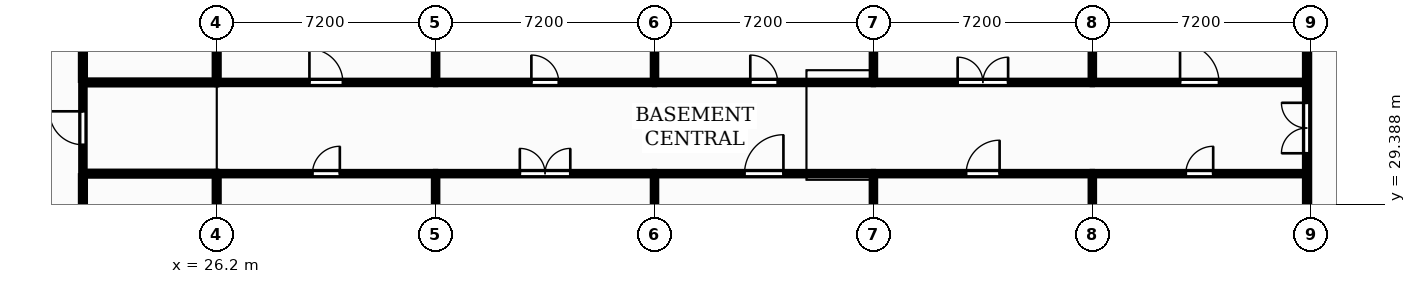
"""IFC4 building model, lengths in metres.
Left out: names, types, materials, properties, quantities, classifications, styles, units other than length and angle.
Written with IfcOpenShell. Run it as: python <this file> out.ifc"""

import sys

from ifc_helpers import new_model, si_unit, direction, frame, frame_2d, origin, place, context, subcontext, project, spatial, rectangle, extrude, element, fill, save


model = new_model("IFC4")
c1 = context("Model", 3, precision=1e-05, world=origin(), true_north=direction((0.0, 1.0)))
c2 = subcontext(c1, "Body", "Model", "MODEL_VIEW")
j1 = project(units=[si_unit("LENGTHUNIT", "METRE"), si_unit("PLANEANGLEUNIT", "RADIAN")], contexts=[c1])
p1 = place(None, origin())
s1 = spatial("IfcSite", under=j1, at=p1, CompositionType="ELEMENT")
p2 = place(p1, origin())
s2 = spatial("IfcBuilding", under=s1, at=p2, CompositionType="ELEMENT")
p3 = place(p2, frame((0.0, 0.0, -4.5)))
s3 = spatial("IfcBuildingStorey", under=s2, at=p3, CompositionType="ELEMENT", Elevation=-4.5)
p4 = place(p3, frame((21.8, 27.27, 0.0), z_axis=(0.0, 0.0, 1.0), x_axis=(0.0, 1.0, 0.0)))
e1 = element("IfcWall", 1, at=p4, inside=s3, PredefinedType="PARTITIONING", context=c2, shape_type="SweptSolid", body=[
    extrude(rectangle(XDim=3.06, YDim=0.16, at=frame_2d((1.53, 0.0))), origin(), (0.0, 0.0, 1.0), 4.08),
])
p5 = place(p4, frame((1.05, 0.0, 0.0)))
e2 = element("IfcOpeningElement", 2, at=p5, cuts=e1, PredefinedType="OPENING", context=c2, shape_type="SweptSolid", body=[
    extrude(rectangle(XDim=0.96, YDim=2.1, at=frame_2d((0.48, 1.05))), frame((0.0, 0.09, 0.0), z_axis=(0.0, -1.0, 0.0), x_axis=(1.0, 0.0, 0.0)), (0.0, 0.0, 1.0), 0.18),
])
p6 = place(p3, frame((21.8, 30.47, 0.0), z_axis=(0.0, 0.0, 1.0), x_axis=(0.0, 1.0, 0.0)))
e3 = element("IfcWall", 3, at=p6, inside=s3, PredefinedType="PARTITIONING", context=c2, shape_type="SweptSolid", body=[
    extrude(rectangle(XDim=2.86, YDim=0.14, at=frame_2d((1.43, 0.0))), origin(), (0.0, 0.0, 1.0), 4.08),
])
p7 = place(p6, frame((0.88, 0.0, 0.0)))
e4 = element("IfcOpeningElement", 4, at=p7, cuts=e3, PredefinedType="OPENING", context=c2, shape_type="SweptSolid", body=[
    extrude(rectangle(XDim=1.1, YDim=2.1, at=frame_2d((0.55, 1.05))), frame((0.0, 0.08, 0.0), z_axis=(0.0, -1.0, 0.0), x_axis=(1.0, 0.0, 0.0)), (0.0, 0.0, 1.0), 0.16),
])
p8 = place(p3, frame((21.8, 30.4, 0.0), z_axis=(0.0, 0.0, 1.0), x_axis=(1.0, 0.0, 0.0)))
e5 = element("IfcWall", 5, at=p8, inside=s3, PredefinedType="PARTITIONING", context=c2, shape_type="SweptSolid", body=[
    extrude(rectangle(XDim=4.4, YDim=0.16, at=frame_2d((2.2, 0.0))), origin(), (0.0, 0.0, 1.0), 4.08),
])
p9 = place(p3, frame((21.8, 33.47, 0.0), z_axis=(0.0, 0.0, 1.0), x_axis=(0.0, 1.0, 0.0)))
e6 = element("IfcWall", 6, at=p9, inside=s3, PredefinedType="PARTITIONING", context=c2, shape_type="SweptSolid", body=[
    extrude(rectangle(XDim=3.26, YDim=0.16, at=frame_2d((1.63, 0.0))), origin(), (0.0, 0.0, 1.0), 4.08),
])
p10 = place(p9, frame((1.15, 0.0, 0.0)))
e7 = element("IfcOpeningElement", 7, at=p10, cuts=e6, PredefinedType="OPENING", context=c2, shape_type="SweptSolid", body=[
    extrude(rectangle(XDim=0.96, YDim=2.1, at=frame_2d((0.48, 1.05))), frame((0.0, 0.09, 0.0), z_axis=(0.0, -1.0, 0.0), x_axis=(1.0, 0.0, 0.0)), (0.0, 0.0, 1.0), 0.18),
])
p11 = place(p3, frame((21.8, 33.4, 0.0), z_axis=(0.0, 0.0, 1.0), x_axis=(1.0, 0.0, 0.0)))
e8 = element("IfcWall", 8, at=p11, inside=s3, PredefinedType="PARTITIONING", context=c2, shape_type="SweptSolid", body=[
    extrude(rectangle(XDim=4.4, YDim=0.16, at=frame_2d((2.2, 0.0))), origin(), (0.0, 0.0, 1.0), 4.08),
])
p12 = place(p3, frame((26.2, 27.55, 0.0), z_axis=(0.0, 0.0, 1.0), x_axis=(0.0, 1.0, 0.0)))
e9 = element("IfcWall", 9, at=p12, inside=s3, PredefinedType="PARTITIONING", context=c2, shape_type="SweptSolid", body=[
    extrude(rectangle(XDim=2.78, YDim=0.16, at=frame_2d((1.39, 0.0))), origin(), (0.0, 0.0, 1.0), 3.4),
])
p13 = place(p3, frame((26.2, 30.4, 0.0), z_axis=(0.0, 0.0, 1.0), x_axis=(1.0, 0.0, 0.0)))
e10 = element("IfcWall", 10, at=p13, inside=s3, PredefinedType="PARTITIONING", context=c2, shape_type="SweptSolid", body=[
    extrude(rectangle(XDim=7.2, YDim=0.14, at=frame_2d((3.6, 0.0))), origin(), (0.0, 0.0, 1.0), 4.08),
])
p14 = place(p13, frame((3.15, 0.0, 0.0)))
e11 = element("IfcOpeningElement", 11, at=p14, cuts=e10, PredefinedType="OPENING", context=c2, shape_type="SweptSolid", body=[
    extrude(rectangle(XDim=0.9, YDim=2.1, at=frame_2d((0.45, 1.05))), frame((0.0, 0.08, 0.0), z_axis=(0.0, -1.0, 0.0), x_axis=(1.0, 0.0, 0.0)), (0.0, 0.0, 1.0), 0.16),
])
p15 = place(p3, frame((26.2, 33.47, 0.0), z_axis=(0.0, 0.0, 1.0), x_axis=(0.0, 1.0, 0.0)))
e12 = element("IfcWall", 12, at=p15, inside=s3, PredefinedType="PARTITIONING", context=c2, shape_type="SweptSolid", body=[
    extrude(rectangle(XDim=2.955, YDim=0.16, at=frame_2d((1.478, 0.0))), origin(), (0.0, 0.0, 1.0), 3.4),
])
p16 = place(p3, frame((26.2, 33.4, 0.0), z_axis=(0.0, 0.0, 1.0), x_axis=(1.0, 0.0, 0.0)))
e13 = element("IfcWall", 13, at=p16, inside=s3, PredefinedType="PARTITIONING", context=c2, shape_type="SweptSolid", body=[
    extrude(rectangle(XDim=7.2, YDim=0.14, at=frame_2d((3.6, 0.0))), origin(), (0.0, 0.0, 1.0), 4.08),
])
p17 = place(p16, frame((3.05, 0.0, 0.0)))
e14 = element("IfcOpeningElement", 14, at=p17, cuts=e13, PredefinedType="OPENING", context=c2, shape_type="SweptSolid", body=[
    extrude(rectangle(XDim=1.1, YDim=2.1, at=frame_2d((0.55, 1.05))), frame((0.0, 0.08, 0.0), z_axis=(0.0, -1.0, 0.0), x_axis=(1.0, 0.0, 0.0)), (0.0, 0.0, 1.0), 0.16),
])
p18 = place(p3, frame((33.4, 27.525, 0.0), z_axis=(0.0, 0.0, 1.0), x_axis=(0.0, 1.0, 0.0)))
e15 = element("IfcWall", 15, at=p18, inside=s3, PredefinedType="PARTITIONING", context=c2, shape_type="SweptSolid", body=[
    extrude(rectangle(XDim=2.805, YDim=0.14, at=frame_2d((1.403, 0.0))), origin(), (0.0, 0.0, 1.0), 3.4),
])
p19 = place(p3, frame((33.4, 30.4, 0.0), z_axis=(0.0, 0.0, 1.0), x_axis=(1.0, 0.0, 0.0)))
e16 = element("IfcWall", 16, at=p19, inside=s3, PredefinedType="PARTITIONING", context=c2, shape_type="SweptSolid", body=[
    extrude(rectangle(XDim=7.2, YDim=0.14, at=frame_2d((3.6, 0.0))), origin(), (0.0, 0.0, 1.0), 4.08),
])
p20 = place(p19, frame((2.77, 0.0, 0.0)))
e17 = element("IfcOpeningElement", 17, at=p20, cuts=e16, PredefinedType="OPENING", context=c2, shape_type="SweptSolid", body=[
    extrude(rectangle(XDim=1.66, YDim=2.3, at=frame_2d((0.83, 1.15))), frame((0.0, 0.08, 0.0), z_axis=(0.0, -1.0, 0.0), x_axis=(1.0, 0.0, 0.0)), (0.0, 0.0, 1.0), 0.16),
])
p21 = place(p3, frame((33.4, 33.47, 0.0), z_axis=(0.0, 0.0, 1.0), x_axis=(0.0, 1.0, 0.0)))
e18 = element("IfcWall", 18, at=p21, inside=s3, PredefinedType="PARTITIONING", context=c2, shape_type="SweptSolid", body=[
    extrude(rectangle(XDim=3.005, YDim=0.14, at=frame_2d((1.502, 0.0))), origin(), (0.0, 0.0, 1.0), 3.4),
])
p22 = place(p3, frame((33.4, 33.4, 0.0), z_axis=(0.0, 0.0, 1.0), x_axis=(1.0, 0.0, 0.0)))
e19 = element("IfcWall", 19, at=p22, inside=s3, PredefinedType="PARTITIONING", context=c2, shape_type="SweptSolid", body=[
    extrude(rectangle(XDim=7.2, YDim=0.14, at=frame_2d((3.6, 0.0))), origin(), (0.0, 0.0, 1.0), 4.08),
])
p23 = place(p22, frame((3.15, 0.0, 0.0)))
e20 = element("IfcOpeningElement", 20, at=p23, cuts=e19, PredefinedType="OPENING", context=c2, shape_type="SweptSolid", body=[
    extrude(rectangle(XDim=0.9, YDim=2.1, at=frame_2d((0.45, 1.05))), frame((0.0, 0.08, 0.0), z_axis=(0.0, -1.0, 0.0), x_axis=(1.0, 0.0, 0.0)), (0.0, 0.0, 1.0), 0.16),
])
p24 = place(p3, frame((40.6, 27.575, 0.0), z_axis=(0.0, 0.0, 1.0), x_axis=(0.0, 1.0, 0.0)))
e21 = element("IfcWall", 21, at=p24, inside=s3, PredefinedType="PARTITIONING", context=c2, shape_type="SweptSolid", body=[
    extrude(rectangle(XDim=2.755, YDim=0.14, at=frame_2d((1.377, 0.0))), origin(), (0.0, 0.0, 1.0), 3.4),
])
p25 = place(p3, frame((40.6, 30.4, 0.0), z_axis=(0.0, 0.0, 1.0), x_axis=(1.0, 0.0, 0.0)))
e22 = element("IfcWall", 22, at=p25, inside=s3, PredefinedType="PARTITIONING", context=c2, shape_type="SweptSolid", body=[
    extrude(rectangle(XDim=7.2, YDim=0.14, at=frame_2d((3.6, 0.0))), origin(), (0.0, 0.0, 1.0), 4.08),
])
p26 = place(p25, frame((2.96, 0.0, 0.0)))
e23 = element("IfcOpeningElement", 23, at=p26, cuts=e22, PredefinedType="OPENING", context=c2, shape_type="SweptSolid", body=[
    extrude(rectangle(XDim=1.28, YDim=2.2, at=frame_2d((0.64, 1.1))), frame((0.0, 0.08, 0.0), z_axis=(0.0, -1.0, 0.0), x_axis=(1.0, 0.0, 0.0)), (0.0, 0.0, 1.0), 0.16),
])
p27 = place(p3, frame((40.6, 33.47, 0.0), z_axis=(0.0, 0.0, 1.0), x_axis=(0.0, 1.0, 0.0)))
e24 = element("IfcWall", 24, at=p27, inside=s3, PredefinedType="PARTITIONING", context=c2, shape_type="SweptSolid", body=[
    extrude(rectangle(XDim=2.98, YDim=0.14, at=frame_2d((1.49, 0.0))), origin(), (0.0, 0.0, 1.0), 3.4),
])
p28 = place(p3, frame((40.6, 33.4, 0.0), z_axis=(0.0, 0.0, 1.0), x_axis=(1.0, 0.0, 0.0)))
e25 = element("IfcWall", 25, at=p28, inside=s3, PredefinedType="PARTITIONING", context=c2, shape_type="SweptSolid", body=[
    extrude(rectangle(XDim=7.2, YDim=0.14, at=frame_2d((3.6, 0.0))), origin(), (0.0, 0.0, 1.0), 4.08),
])
p29 = place(p28, frame((3.15, 0.0, 0.0)))
e26 = element("IfcOpeningElement", 26, at=p29, cuts=e25, PredefinedType="OPENING", context=c2, shape_type="SweptSolid", body=[
    extrude(rectangle(XDim=0.9, YDim=2.1, at=frame_2d((0.45, 1.05))), frame((0.0, 0.08, 0.0), z_axis=(0.0, -1.0, 0.0), x_axis=(1.0, 0.0, 0.0)), (0.0, 0.0, 1.0), 0.16),
])
p30 = place(p3, frame((47.8, 27.55, 0.0), z_axis=(0.0, 0.0, 1.0), x_axis=(0.0, 1.0, 0.0)))
e27 = element("IfcWall", 27, at=p30, inside=s3, PredefinedType="PARTITIONING", context=c2, shape_type="SweptSolid", body=[
    extrude(rectangle(XDim=2.78, YDim=0.14, at=frame_2d((1.39, 0.0))), origin(), (0.0, 0.0, 1.0), 3.4),
])
p31 = place(p3, frame((47.8, 30.4, 0.0), z_axis=(0.0, 0.0, 1.0), x_axis=(1.0, 0.0, 0.0)))
e28 = element("IfcWall", 28, at=p31, inside=s3, PredefinedType="PARTITIONING", context=c2, shape_type="SweptSolid", body=[
    extrude(rectangle(XDim=7.2, YDim=0.14, at=frame_2d((3.6, 0.0))), origin(), (0.0, 0.0, 1.0), 4.08),
])
p32 = place(p31, frame((3.05, 0.0, 0.0)))
e29 = element("IfcOpeningElement", 29, at=p32, cuts=e28, PredefinedType="OPENING", context=c2, shape_type="SweptSolid", body=[
    extrude(rectangle(XDim=1.1, YDim=2.1, at=frame_2d((0.55, 1.05))), frame((0.0, 0.08, 0.0), z_axis=(0.0, -1.0, 0.0), x_axis=(1.0, 0.0, 0.0)), (0.0, 0.0, 1.0), 0.16),
])
p33 = place(p3, frame((47.8, 33.47, 0.0), z_axis=(0.0, 0.0, 1.0), x_axis=(0.0, 1.0, 0.0)))
e30 = element("IfcWall", 30, at=p33, inside=s3, PredefinedType="PARTITIONING", context=c2, shape_type="SweptSolid", body=[
    extrude(rectangle(XDim=3.005, YDim=0.14, at=frame_2d((1.502, 0.0))), origin(), (0.0, 0.0, 1.0), 3.4),
])
p34 = place(p3, frame((47.8, 33.4, 0.0), z_axis=(0.0, 0.0, 1.0), x_axis=(1.0, 0.0, 0.0)))
e31 = element("IfcWall", 31, at=p34, inside=s3, PredefinedType="PARTITIONING", context=c2, shape_type="SweptSolid", body=[
    extrude(rectangle(XDim=7.2, YDim=0.14, at=frame_2d((3.6, 0.0))), origin(), (0.0, 0.0, 1.0), 4.08),
])
p35 = place(p34, frame((2.77, 0.0, 0.0)))
e32 = element("IfcOpeningElement", 32, at=p35, cuts=e31, PredefinedType="OPENING", context=c2, shape_type="SweptSolid", body=[
    extrude(rectangle(XDim=1.66, YDim=2.3, at=frame_2d((0.83, 1.15))), frame((0.0, 0.08, 0.0), z_axis=(0.0, -1.0, 0.0), x_axis=(1.0, 0.0, 0.0)), (0.0, 0.0, 1.0), 0.16),
])
p36 = place(p3, frame((55.0, 27.575, 0.0), z_axis=(0.0, 0.0, 1.0), x_axis=(0.0, 1.0, 0.0)))
e33 = element("IfcWall", 33, at=p36, inside=s3, PredefinedType="PARTITIONING", context=c2, shape_type="SweptSolid", body=[
    extrude(rectangle(XDim=2.755, YDim=0.14, at=frame_2d((1.377, 0.0))), origin(), (0.0, 0.0, 1.0), 3.4),
])
p37 = place(p3, frame((55.0, 30.4, 0.0), z_axis=(0.0, 0.0, 1.0), x_axis=(1.0, 0.0, 0.0)))
e34 = element("IfcWall", 34, at=p37, inside=s3, PredefinedType="PARTITIONING", context=c2, shape_type="SweptSolid", body=[
    extrude(rectangle(XDim=7.05, YDim=0.14, at=frame_2d((3.525, 0.0))), origin(), (0.0, 0.0, 1.0), 4.08),
])
p38 = place(p37, frame((3.075, 0.0, 0.0)))
e35 = element("IfcOpeningElement", 35, at=p38, cuts=e34, PredefinedType="OPENING", context=c2, shape_type="SweptSolid", body=[
    extrude(rectangle(XDim=0.9, YDim=2.1, at=frame_2d((0.45, 1.05))), frame((0.0, 0.08, 0.0), z_axis=(0.0, -1.0, 0.0), x_axis=(1.0, 0.0, 0.0)), (0.0, 0.0, 1.0), 0.16),
])
p39 = place(p3, frame((55.0, 33.47, 0.0), z_axis=(0.0, 0.0, 1.0), x_axis=(0.0, 1.0, 0.0)))
e36 = element("IfcWall", 36, at=p39, inside=s3, PredefinedType="PARTITIONING", context=c2, shape_type="SweptSolid", body=[
    extrude(rectangle(XDim=2.955, YDim=0.14, at=frame_2d((1.478, 0.0))), origin(), (0.0, 0.0, 1.0), 3.4),
])
p40 = place(p3, frame((55.0, 33.4, 0.0), z_axis=(0.0, 0.0, 1.0), x_axis=(1.0, 0.0, 0.0)))
e37 = element("IfcWall", 37, at=p40, inside=s3, PredefinedType="PARTITIONING", context=c2, shape_type="SweptSolid", body=[
    extrude(rectangle(XDim=7.05, YDim=0.14, at=frame_2d((3.525, 0.0))), origin(), (0.0, 0.0, 1.0), 4.08),
])
p41 = place(p40, frame((2.885, 0.0, 0.0)))
e38 = element("IfcOpeningElement", 38, at=p41, cuts=e37, PredefinedType="OPENING", context=c2, shape_type="SweptSolid", body=[
    extrude(rectangle(XDim=1.28, YDim=2.2, at=frame_2d((0.64, 1.1))), frame((0.0, 0.08, 0.0), z_axis=(0.0, -1.0, 0.0), x_axis=(1.0, 0.0, 0.0)), (0.0, 0.0, 1.0), 0.16),
])
p42 = place(p3, frame((62.05, 27.525, 0.0), z_axis=(0.0, 0.0, 1.0), x_axis=(0.0, 1.0, 0.0)))
e39 = element("IfcWall", 39, at=p42, inside=s3, PredefinedType="PARTITIONING", context=c2, shape_type="SweptSolid", body=[
    extrude(rectangle(XDim=2.805, YDim=0.14, at=frame_2d((1.403, 0.0))), origin(), (0.0, 0.0, 1.0), 3.4),
])
p43 = place(p3, frame((62.05, 30.47, 0.0), z_axis=(0.0, 0.0, 1.0), x_axis=(0.0, 1.0, 0.0)))
e40 = element("IfcWall", 40, at=p43, inside=s3, PredefinedType="PARTITIONING", context=c2, shape_type="SweptSolid", body=[
    extrude(rectangle(XDim=2.86, YDim=0.14, at=frame_2d((1.43, 0.0))), origin(), (0.0, 0.0, 1.0), 3.4),
])
p44 = place(p43, frame((0.6, 0.0, 0.0)))
e41 = element("IfcOpeningElement", 41, at=p44, cuts=e40, PredefinedType="OPENING", context=c2, shape_type="SweptSolid", body=[
    extrude(rectangle(XDim=1.66, YDim=2.3, at=frame_2d((0.83, 1.15))), frame((0.0, 0.08, 0.0), z_axis=(0.0, -1.0, 0.0), x_axis=(1.0, 0.0, 0.0)), (0.0, 0.0, 1.0), 0.16),
])
p45 = place(p3, frame((62.05, 33.47, 0.0), z_axis=(0.0, 0.0, 1.0), x_axis=(0.0, 1.0, 0.0)))
e42 = element("IfcWall", 42, at=p45, inside=s3, PredefinedType="PARTITIONING", context=c2, shape_type="SweptSolid", body=[
    extrude(rectangle(XDim=2.98, YDim=0.14, at=frame_2d((1.49, 0.0))), origin(), (0.0, 0.0, 1.0), 3.4),
])
p46 = place(p7, origin())
e43 = element("IfcDoor", 43, at=p46, inside=s3, OperationType="SINGLE_SWING_RIGHT", PredefinedType="DOOR", context=c2, shape_type="SweptSolid", body=[
    extrude(rectangle(XDim=1.1, YDim=2.1, at=frame_2d((0.55, 1.05))), frame((0.0, 0.025, 0.0), z_axis=(0.0, -1.0, 0.0), x_axis=(1.0, 0.0, 0.0)), (0.0, 0.0, 1.0), 0.05),
])
fill(e4, e43)
p47 = place(p44, origin())
e44 = element("IfcDoor", 44, at=p47, inside=s3, OperationType="DOUBLE_DOOR_SINGLE_SWING", PredefinedType="DOOR", context=c2, shape_type="SweptSolid", body=[
    extrude(rectangle(XDim=1.66, YDim=2.3, at=frame_2d((0.83, 1.15))), frame((0.0, 0.025, 0.0), z_axis=(0.0, -1.0, 0.0), x_axis=(1.0, 0.0, 0.0)), (0.0, 0.0, 1.0), 0.05),
])
fill(e41, e44)
p48 = place(p14, origin())
e45 = element("IfcDoor", 45, at=p48, inside=s3, OperationType="SINGLE_SWING_RIGHT", PredefinedType="DOOR", context=c2, shape_type="SweptSolid", body=[
    extrude(rectangle(XDim=0.9, YDim=2.1, at=frame_2d((0.45, 1.05))), frame((0.0, 0.025, 0.0), z_axis=(0.0, -1.0, 0.0), x_axis=(1.0, 0.0, 0.0)), (0.0, 0.0, 1.0), 0.05),
])
fill(e11, e45)
p49 = place(p17, origin())
e46 = element("IfcDoor", 46, at=p49, inside=s3, OperationType="SINGLE_SWING_LEFT", PredefinedType="DOOR", context=c2, shape_type="SweptSolid", body=[
    extrude(rectangle(XDim=1.1, YDim=2.1, at=frame_2d((0.55, 1.05))), frame((0.0, 0.025, 0.0), z_axis=(0.0, -1.0, 0.0), x_axis=(1.0, 0.0, 0.0)), (0.0, 0.0, 1.0), 0.05),
])
fill(e14, e46)
p50 = place(p20, origin())
e47 = element("IfcDoor", 47, at=p50, inside=s3, OperationType="DOUBLE_DOOR_SINGLE_SWING", PredefinedType="DOOR", context=c2, shape_type="SweptSolid", body=[
    extrude(rectangle(XDim=1.66, YDim=2.3, at=frame_2d((0.83, 1.15))), frame((0.0, 0.025, 0.0), z_axis=(0.0, -1.0, 0.0), x_axis=(1.0, 0.0, 0.0)), (0.0, 0.0, 1.0), 0.05),
])
fill(e17, e47)
p51 = place(p23, origin())
e48 = element("IfcDoor", 48, at=p51, inside=s3, OperationType="SINGLE_SWING_LEFT", PredefinedType="DOOR", context=c2, shape_type="SweptSolid", body=[
    extrude(rectangle(XDim=0.9, YDim=2.1, at=frame_2d((0.45, 1.05))), frame((0.0, 0.025, 0.0), z_axis=(0.0, -1.0, 0.0), x_axis=(1.0, 0.0, 0.0)), (0.0, 0.0, 1.0), 0.05),
])
fill(e20, e48)
p52 = place(p26, origin())
e49 = element("IfcDoor", 49, at=p52, inside=s3, OperationType="SINGLE_SWING_RIGHT", PredefinedType="DOOR", context=c2, shape_type="SweptSolid", body=[
    extrude(rectangle(XDim=1.28, YDim=2.2, at=frame_2d((0.64, 1.1))), frame((0.0, 0.025, 0.0), z_axis=(0.0, -1.0, 0.0), x_axis=(1.0, 0.0, 0.0)), (0.0, 0.0, 1.0), 0.05),
])
fill(e23, e49)
p53 = place(p29, origin())
e50 = element("IfcDoor", 50, at=p53, inside=s3, OperationType="SINGLE_SWING_LEFT", PredefinedType="DOOR", context=c2, shape_type="SweptSolid", body=[
    extrude(rectangle(XDim=0.9, YDim=2.1, at=frame_2d((0.45, 1.05))), frame((0.0, 0.025, 0.0), z_axis=(0.0, -1.0, 0.0), x_axis=(1.0, 0.0, 0.0)), (0.0, 0.0, 1.0), 0.05),
])
fill(e26, e50)
p54 = place(p32, origin())
e51 = element("IfcDoor", 51, at=p54, inside=s3, OperationType="SINGLE_SWING_RIGHT", PredefinedType="DOOR", context=c2, shape_type="SweptSolid", body=[
    extrude(rectangle(XDim=1.1, YDim=2.1, at=frame_2d((0.55, 1.05))), frame((0.0, 0.025, 0.0), z_axis=(0.0, -1.0, 0.0), x_axis=(1.0, 0.0, 0.0)), (0.0, 0.0, 1.0), 0.05),
])
fill(e29, e51)
p55 = place(p35, origin())
e52 = element("IfcDoor", 52, at=p55, inside=s3, OperationType="DOUBLE_DOOR_SINGLE_SWING", PredefinedType="DOOR", context=c2, shape_type="SweptSolid", body=[
    extrude(rectangle(XDim=1.66, YDim=2.3, at=frame_2d((0.83, 1.15))), frame((0.0, 0.025, 0.0), z_axis=(0.0, -1.0, 0.0), x_axis=(1.0, 0.0, 0.0)), (0.0, 0.0, 1.0), 0.05),
])
fill(e32, e52)
p56 = place(p38, origin())
e53 = element("IfcDoor", 53, at=p56, inside=s3, OperationType="SINGLE_SWING_RIGHT", PredefinedType="DOOR", context=c2, shape_type="SweptSolid", body=[
    extrude(rectangle(XDim=0.9, YDim=2.1, at=frame_2d((0.45, 1.05))), frame((0.0, 0.025, 0.0), z_axis=(0.0, -1.0, 0.0), x_axis=(1.0, 0.0, 0.0)), (0.0, 0.0, 1.0), 0.05),
])
fill(e35, e53)
p57 = place(p41, origin())
e54 = element("IfcDoor", 54, at=p57, inside=s3, OperationType="SINGLE_SWING_LEFT", PredefinedType="DOOR", context=c2, shape_type="SweptSolid", body=[
    extrude(rectangle(XDim=1.28, YDim=2.2, at=frame_2d((0.64, 1.1))), frame((0.0, 0.025, 0.0), z_axis=(0.0, -1.0, 0.0), x_axis=(1.0, 0.0, 0.0)), (0.0, 0.0, 1.0), 0.05),
])
fill(e38, e54)
save(model, sys.argv[1])
